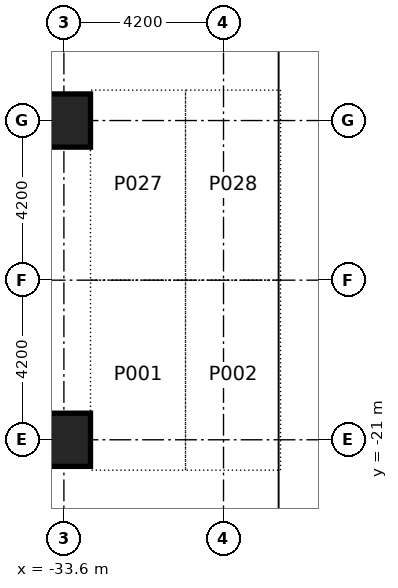
"""IFC4 building model, lengths in metres.
Left out: names, types, materials, properties, quantities, classifications, styles, units other than length and angle.
Written with IfcOpenShell. Run it as: python <this file> out.ifc"""

import sys

from ifc_helpers import new_model, si_unit, direction, frame, origin, origin_2d, place, context, subcontext, project, spatial, rectangle, extrude, element, save


model = new_model("IFC4")
c1 = context("Model", 3, precision=1e-05, world=origin(), true_north=direction((0.0, 1.0)))
c2 = subcontext(c1, "Body", "Model", "MODEL_VIEW")
j1 = project(units=[si_unit("LENGTHUNIT", "METRE"), si_unit("PLANEANGLEUNIT", "RADIAN")], contexts=[c1])
p1 = place(None, origin())
s1 = spatial("IfcSite", under=j1, at=p1, CompositionType="ELEMENT")
p2 = place(p1, origin())
s2 = spatial("IfcBuilding", under=s1, at=p2, CompositionType="ELEMENT")
p3 = place(p2, frame((0.0, 0.0, -8.4)))
s3 = spatial("IfcBuildingStorey", under=s2, at=p3, CompositionType="ELEMENT", Elevation=-8.4)
for number, where, z_axis, x_axis in (
    (1, (-33.6, -21.0, -0.5), (0.0, 0.0, 1.0), (1.0, 0.0, 0.0)),
    (2, (-33.6, -12.6, -0.5), (0.0, 0.0, 1.0), (1.0, 0.0, 0.0)),
):
    element("IfcColumn", number, at=place(p3, frame(where, z_axis=z_axis, x_axis=x_axis)), inside=s3, PredefinedType="COLUMN", context=c2, shape_type="SweptSolid", body=[
        extrude(rectangle(XDim=1.4, YDim=1.4, at=origin_2d()), origin(), (0.0, 0.0, 1.0), 4.7),
    ])
save(model, sys.argv[1])
